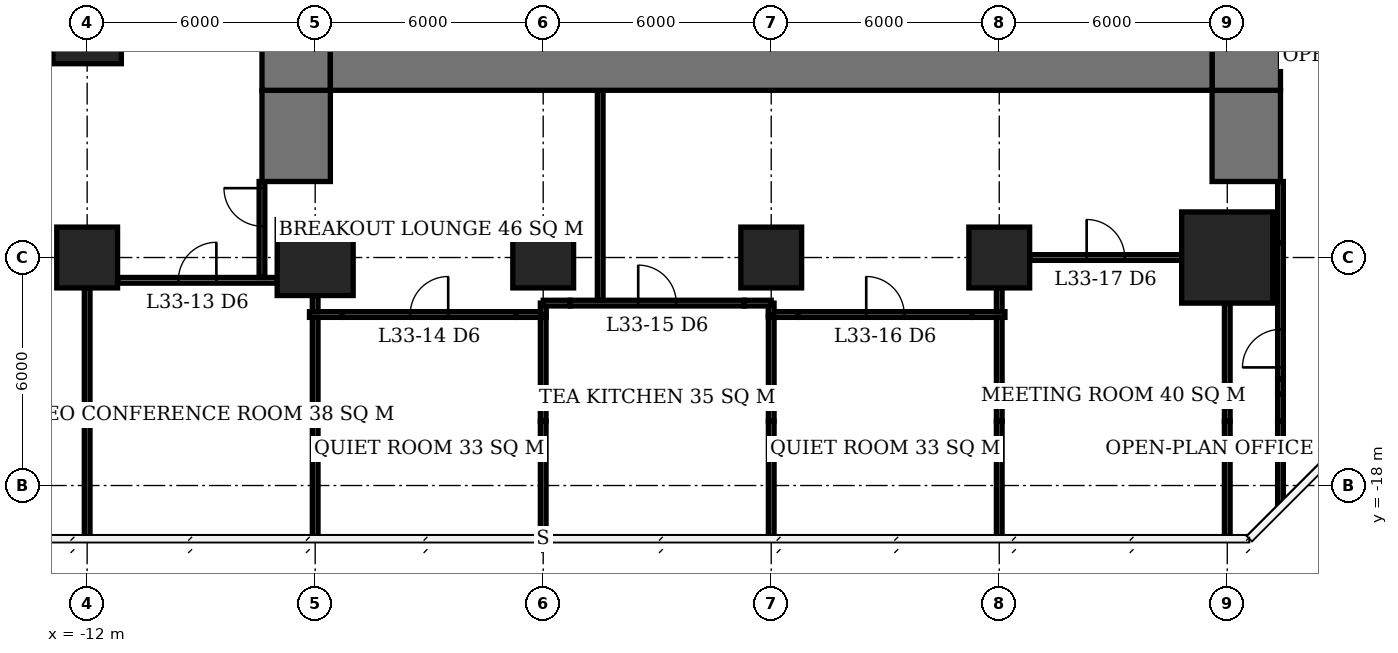
"""IFC4 building model, lengths in metres.
Left out: names, types, materials, properties, quantities, classifications, styles, units other than length and angle.
Written with IfcOpenShell. Run it as: python <this file> out.ifc"""

import sys

from ifc_helpers import new_model, si_unit, direction, frame, frame_2d, origin, origin_2d, place, context, subcontext, project, spatial, rectangle, extrude, element, fill, save


model = new_model("IFC4")
c1 = context("Model", 3, precision=1e-05, world=origin(), true_north=direction((0.0, 1.0)))
c2 = subcontext(c1, "Body", "Model", "MODEL_VIEW")
j1 = project(units=[si_unit("LENGTHUNIT", "METRE"), si_unit("PLANEANGLEUNIT", "RADIAN")], contexts=[c1])
p1 = place(None, origin())
s1 = spatial("IfcSite", under=j1, at=p1, CompositionType="ELEMENT")
p2 = place(p1, origin())
s2 = spatial("IfcBuilding", under=s1, at=p2, CompositionType="ELEMENT")
p3 = place(p2, frame((0.0, 0.0, 136.7)))
s3 = spatial("IfcBuildingStorey", under=s2, at=p3, CompositionType="ELEMENT", Elevation=136.7)
p4 = place(p3, frame((-12.0, -12.0, 0.0), z_axis=(0.0, 0.0, 1.0), x_axis=(1.0, 0.0, 0.0)))
e1 = element("IfcColumn", 1, at=p4, inside=s3, PredefinedType="COLUMN", context=c2, shape_type="SweptSolid", body=[
    extrude(rectangle(XDim=1.6, YDim=1.6, at=origin_2d()), origin(), (0.0, 0.0, 1.0), 3.9),
])
p5 = place(p3, frame((-12.0, -6.0, 0.0), z_axis=(0.0, 0.0, 1.0), x_axis=(1.0, 0.0, 0.0)))
e2 = element("IfcColumn", 2, at=p5, inside=s3, PredefinedType="COLUMN", context=c2, shape_type="SweptSolid", body=[
    extrude(rectangle(XDim=1.8, YDim=1.8, at=origin_2d()), origin(), (0.0, 0.0, 1.0), 3.9),
])
p6 = place(p3, frame((-6.0, -12.0, 0.0), z_axis=(0.0, 0.0, 1.0), x_axis=(1.0, 0.0, 0.0)))
e3 = element("IfcColumn", 3, at=p6, inside=s3, PredefinedType="COLUMN", context=c2, shape_type="SweptSolid", body=[
    extrude(rectangle(XDim=2.0, YDim=2.0, at=origin_2d()), origin(), (0.0, 0.0, 1.0), 3.9),
])
for number, where, z_axis, x_axis in (
    (4, (0.0, -12.0, 0.0), (0.0, 0.0, 1.0), (1.0, 0.0, 0.0)),
    (5, (6.0, -12.0, 0.0), (0.0, 0.0, 1.0), (1.0, 0.0, 0.0)),
    (6, (12.0, -12.0, 0.0), (0.0, 0.0, 1.0), (1.0, 0.0, 0.0)),
):
    element("IfcColumn", number, at=place(p3, frame(where, z_axis=z_axis, x_axis=x_axis)), inside=s3, PredefinedType="COLUMN", context=c2, shape_type="SweptSolid", body=[
        extrude(rectangle(XDim=1.6, YDim=1.6, at=origin_2d()), origin(), (0.0, 0.0, 1.0), 3.9),
    ])
p7 = place(p3, frame((18.0, -12.0, 0.0), z_axis=(0.0, 0.0, 1.0), x_axis=(1.0, 0.0, 0.0)))
e7 = element("IfcColumn", 7, at=p7, inside=s3, PredefinedType="COLUMN", context=c2, shape_type="SweptSolid", body=[
    extrude(rectangle(XDim=2.4, YDim=2.4, at=origin_2d()), origin(), (0.0, 0.0, 1.0), 3.9),
])
p8 = place(p3, frame((-5.6, -6.6, 0.0), z_axis=(0.0, 0.0, 1.0), x_axis=(1.0, 0.0, 0.0)))
e8 = element("IfcWall", 8, at=p8, inside=s3, PredefinedType="SHEAR", context=c2, shape_type="SweptSolid", body=[
    extrude(rectangle(XDim=23.2, YDim=2.0, at=frame_2d((11.6, 0.0))), origin(), (0.0, 0.0, 1.0), 3.9),
])
p9 = place(p3, frame((-6.5, -7.6, 0.0), z_axis=(0.0, 0.0, 1.0), x_axis=(0.0, 1.0, 0.0)))
e9 = element("IfcWall", 9, at=p9, inside=s3, PredefinedType="SHEAR", context=c2, shape_type="SweptSolid", body=[
    extrude(rectangle(XDim=21.2, YDim=1.8, at=frame_2d((10.6, 0.0))), origin(), (0.0, 0.0, 1.0), 3.9),
])
p10 = place(p9, frame((7.8, 0.0, 0.0)))
e10 = element("IfcOpeningElement", 10, at=p10, cuts=e9, PredefinedType="OPENING", context=c2, shape_type="SweptSolid", body=[
    extrude(rectangle(XDim=1.8, YDim=2.4, at=frame_2d((0.9, 1.2))), frame((0.0, 0.91, 0.0), z_axis=(0.0, -1.0, 0.0), x_axis=(1.0, 0.0, 0.0)), (0.0, 0.0, 1.0), 1.82),
])
p11 = place(p3, frame((18.5, -7.6, 0.0), z_axis=(0.0, 0.0, 1.0), x_axis=(0.0, 1.0, 0.0)))
e11 = element("IfcWall", 11, at=p11, inside=s3, PredefinedType="SHEAR", context=c2, shape_type="SweptSolid", body=[
    extrude(rectangle(XDim=21.2, YDim=1.8, at=frame_2d((10.6, 0.0))), origin(), (0.0, 0.0, 1.0), 3.9),
])
p12 = place(p11, frame((9.2, 0.0, 0.0)))
e12 = element("IfcOpeningElement", 12, at=p12, cuts=e11, PredefinedType="OPENING", context=c2, shape_type="SweptSolid", body=[
    extrude(rectangle(XDim=1.8, YDim=2.4, at=frame_2d((0.9, 1.2))), frame((0.0, 0.91, 0.0), z_axis=(0.0, -1.0, 0.0), x_axis=(1.0, 0.0, 0.0)), (0.0, 0.0, 1.0), 1.82),
])
for number, where, z_axis, x_axis in (
    (13, (-6.5, -10.0, 0.0), (0.0, 0.0, 1.0), (0.0, 1.0, 0.0)),
    (14, (18.5, -10.0, 0.0), (0.0, 0.0, 1.0), (0.0, 1.0, 0.0)),
):
    element("IfcWall", number, at=place(p3, frame(where, z_axis=z_axis, x_axis=x_axis)), inside=s3, PredefinedType="SHEAR", context=c2, shape_type="SweptSolid", body=[
        extrude(rectangle(XDim=2.4, YDim=1.8, at=frame_2d((1.2, 0.0))), origin(), (0.0, 0.0, 1.0), 3.9),
    ])
p13 = place(p3, frame((-6.15, -13.5, 0.0), z_axis=(0.0, 0.0, 1.0), x_axis=(1.0, 0.0, 0.0)))
e15 = element("IfcWall", 15, at=p13, inside=s3, PredefinedType="PARTITIONING", context=c2, shape_type="SweptSolid", body=[
    extrude(rectangle(XDim=0.86, YDim=0.15, at=frame_2d((0.43, 0.0))), origin(), (0.0, 0.0, 1.0), 2.65),
])
p14 = place(p3, frame((-5.29, -13.5, 0.0), z_axis=(0.0, 0.0, 1.0), x_axis=(1.0, 0.0, 0.0)))
e16 = element("IfcWall", 16, at=p14, inside=s3, PredefinedType="PARTITIONING", context=c2, shape_type="SweptSolid", body=[
    extrude(rectangle(XDim=4.58, YDim=0.15, at=frame_2d((2.29, 0.0))), origin(), (0.0, 0.0, 1.0), 3.65),
])
p15 = place(p14, frame((1.79, 0.0, 0.0)))
e17 = element("IfcOpeningElement", 17, at=p15, cuts=e16, PredefinedType="OPENING", context=c2, shape_type="SweptSolid", body=[
    extrude(rectangle(XDim=1.0, YDim=2.1, at=frame_2d((0.5, 1.05))), frame((0.0, 0.085, 0.0), z_axis=(0.0, -1.0, 0.0), x_axis=(1.0, 0.0, 0.0)), (0.0, 0.0, 1.0), 0.17),
])
for number, where, z_axis, x_axis in (
    (18, (-0.71, -13.5, 0.0), (0.0, 0.0, 1.0), (1.0, 0.0, 0.0)),
    (19, (5.925, -13.5, 0.0), (0.0, 0.0, 1.0), (1.0, 0.0, 0.0)),
):
    element("IfcWall", number, at=place(p3, frame(where, z_axis=z_axis, x_axis=x_axis)), inside=s3, PredefinedType="PARTITIONING", context=c2, shape_type="SweptSolid", body=[
        extrude(rectangle(XDim=0.785, YDim=0.15, at=frame_2d((0.393, 0.0))), origin(), (0.0, 0.0, 1.0), 2.65),
    ])
p16 = place(p3, frame((6.71, -13.5, 0.0), z_axis=(0.0, 0.0, 1.0), x_axis=(1.0, 0.0, 0.0)))
e20 = element("IfcWall", 20, at=p16, inside=s3, PredefinedType="PARTITIONING", context=c2, shape_type="SweptSolid", body=[
    extrude(rectangle(XDim=4.58, YDim=0.15, at=frame_2d((2.29, 0.0))), origin(), (0.0, 0.0, 1.0), 3.65),
])
p17 = place(p16, frame((1.79, 0.0, 0.0)))
e21 = element("IfcOpeningElement", 21, at=p17, cuts=e20, PredefinedType="OPENING", context=c2, shape_type="SweptSolid", body=[
    extrude(rectangle(XDim=1.0, YDim=2.1, at=frame_2d((0.5, 1.05))), frame((0.0, 0.085, 0.0), z_axis=(0.0, -1.0, 0.0), x_axis=(1.0, 0.0, 0.0)), (0.0, 0.0, 1.0), 0.17),
])
p18 = place(p3, frame((11.29, -13.5, 0.0), z_axis=(0.0, 0.0, 1.0), x_axis=(1.0, 0.0, 0.0)))
e22 = element("IfcWall", 22, at=p18, inside=s3, PredefinedType="PARTITIONING", context=c2, shape_type="SweptSolid", body=[
    extrude(rectangle(XDim=0.86, YDim=0.15, at=frame_2d((0.43, 0.0))), origin(), (0.0, 0.0, 1.0), 2.65),
])
p19 = place(p3, frame((0.0, -13.2, 0.0), z_axis=(0.0, 0.0, 1.0), x_axis=(1.0, 0.0, 0.0)))
e23 = element("IfcWall", 23, at=p19, inside=s3, PredefinedType="PARTITIONING", context=c2, shape_type="SweptSolid", body=[
    extrude(rectangle(XDim=0.71, YDim=0.15, at=frame_2d((0.355, 0.0))), origin(), (0.0, 0.0, 1.0), 2.65),
])
p20 = place(p3, frame((0.71, -13.2, 0.0), z_axis=(0.0, 0.0, 1.0), x_axis=(1.0, 0.0, 0.0)))
e24 = element("IfcWall", 24, at=p20, inside=s3, PredefinedType="PARTITIONING", context=c2, shape_type="SweptSolid", body=[
    extrude(rectangle(XDim=4.58, YDim=0.15, at=frame_2d((2.29, 0.0))), origin(), (0.0, 0.0, 1.0), 3.65),
])
p21 = place(p20, frame((1.79, 0.0, 0.0)))
e25 = element("IfcOpeningElement", 25, at=p21, cuts=e24, PredefinedType="OPENING", context=c2, shape_type="SweptSolid", body=[
    extrude(rectangle(XDim=1.0, YDim=2.1, at=frame_2d((0.5, 1.05))), frame((0.0, 0.085, 0.0), z_axis=(0.0, -1.0, 0.0), x_axis=(1.0, 0.0, 0.0)), (0.0, 0.0, 1.0), 0.17),
])
p22 = place(p3, frame((5.29, -13.2, 0.0), z_axis=(0.0, 0.0, 1.0), x_axis=(1.0, 0.0, 0.0)))
e26 = element("IfcWall", 26, at=p22, inside=s3, PredefinedType="PARTITIONING", context=c2, shape_type="SweptSolid", body=[
    extrude(rectangle(XDim=0.71, YDim=0.15, at=frame_2d((0.355, 0.0))), origin(), (0.0, 0.0, 1.0), 2.65),
])
p23 = place(p3, frame((-11.2, -12.6, 0.0), z_axis=(0.0, 0.0, 1.0), x_axis=(1.0, 0.0, 0.0)))
e27 = element("IfcWall", 27, at=p23, inside=s3, PredefinedType="PARTITIONING", context=c2, shape_type="SweptSolid", body=[
    extrude(rectangle(XDim=4.2, YDim=0.15, at=frame_2d((2.1, 0.0))), origin(), (0.0, 0.0, 1.0), 3.65),
])
p24 = place(p23, frame((1.6, 0.0, 0.0)))
e28 = element("IfcOpeningElement", 28, at=p24, cuts=e27, PredefinedType="OPENING", context=c2, shape_type="SweptSolid", body=[
    extrude(rectangle(XDim=1.0, YDim=2.1, at=frame_2d((0.5, 1.05))), frame((0.0, 0.085, 0.0), z_axis=(0.0, -1.0, 0.0), x_axis=(1.0, 0.0, 0.0)), (0.0, 0.0, 1.0), 0.17),
])
p25 = place(p3, frame((12.8, -12.0, 0.0), z_axis=(0.0, 0.0, 1.0), x_axis=(1.0, 0.0, 0.0)))
e29 = element("IfcWall", 29, at=p25, inside=s3, PredefinedType="PARTITIONING", context=c2, shape_type="SweptSolid", body=[
    extrude(rectangle(XDim=4.0, YDim=0.15, at=frame_2d((2.0, 0.0))), origin(), (0.0, 0.0, 1.0), 3.65),
])
p26 = place(p25, frame((1.5, 0.0, 0.0)))
e30 = element("IfcOpeningElement", 30, at=p26, cuts=e29, PredefinedType="OPENING", context=c2, shape_type="SweptSolid", body=[
    extrude(rectangle(XDim=1.0, YDim=2.1, at=frame_2d((0.5, 1.05))), frame((0.0, 0.085, 0.0), z_axis=(0.0, -1.0, 0.0), x_axis=(1.0, 0.0, 0.0)), (0.0, 0.0, 1.0), 0.17),
])
p27 = place(p3, frame((-12.0, -19.4, 0.0), z_axis=(0.0, 0.0, 1.0), x_axis=(0.0, 1.0, 0.0)))
e31 = element("IfcWall", 31, at=p27, inside=s3, PredefinedType="PARTITIONING", context=c2, shape_type="SweptSolid", body=[
    extrude(rectangle(XDim=3.09, YDim=0.15, at=frame_2d((1.545, 0.0))), origin(), (0.0, 0.0, 1.0), 3.65),
])
p28 = place(p3, frame((-12.0, -16.31, 0.0), z_axis=(0.0, 0.0, 1.0), x_axis=(0.0, 1.0, 0.0)))
e32 = element("IfcWall", 32, at=p28, inside=s3, PredefinedType="PARTITIONING", context=c2, shape_type="SweptSolid", body=[
    extrude(rectangle(XDim=3.51, YDim=0.15, at=frame_2d((1.755, 0.0))), origin(), (0.0, 0.0, 1.0), 2.65),
])
p29 = place(p3, frame((-6.0, -19.4, 0.0), z_axis=(0.0, 0.0, 1.0), x_axis=(0.0, 1.0, 0.0)))
e33 = element("IfcWall", 33, at=p29, inside=s3, PredefinedType="PARTITIONING", context=c2, shape_type="SweptSolid", body=[
    extrude(rectangle(XDim=3.09, YDim=0.15, at=frame_2d((1.545, 0.0))), origin(), (0.0, 0.0, 1.0), 3.65),
])
p30 = place(p3, frame((-6.0, -16.31, 0.0), z_axis=(0.0, 0.0, 1.0), x_axis=(0.0, 1.0, 0.0)))
e34 = element("IfcWall", 34, at=p30, inside=s3, PredefinedType="PARTITIONING", context=c2, shape_type="SweptSolid", body=[
    extrude(rectangle(XDim=2.735, YDim=0.15, at=frame_2d((1.368, 0.0))), origin(), (0.0, 0.0, 1.0), 2.65),
])
p31 = place(p3, frame((-6.0, -13.425, 0.0), z_axis=(0.0, 0.0, 1.0), x_axis=(0.0, 1.0, 0.0)))
e35 = element("IfcWall", 35, at=p31, inside=s3, PredefinedType="PARTITIONING", context=c2, shape_type="SweptSolid", body=[
    extrude(rectangle(XDim=0.425, YDim=0.15, at=frame_2d((0.212, 0.0))), origin(), (0.0, 0.0, 1.0), 2.65),
])
p32 = place(p3, frame((0.0, -19.35, 0.0), z_axis=(0.0, 0.0, 1.0), x_axis=(0.0, 1.0, 0.0)))
e36 = element("IfcWall", 36, at=p32, inside=s3, PredefinedType="PARTITIONING", context=c2, shape_type="SweptSolid", body=[
    extrude(rectangle(XDim=3.04, YDim=0.15, at=frame_2d((1.52, 0.0))), origin(), (0.0, 0.0, 1.0), 3.65),
])
p33 = place(p3, frame((0.0, -16.31, 0.0), z_axis=(0.0, 0.0, 1.0), x_axis=(0.0, 1.0, 0.0)))
e37 = element("IfcWall", 37, at=p33, inside=s3, PredefinedType="PARTITIONING", context=c2, shape_type="SweptSolid", body=[
    extrude(rectangle(XDim=2.735, YDim=0.15, at=frame_2d((1.368, 0.0))), origin(), (0.0, 0.0, 1.0), 2.65),
])
p34 = place(p3, frame((0.0, -13.5, 0.0), z_axis=(0.0, 0.0, 1.0), x_axis=(0.0, 1.0, 0.0)))
e38 = element("IfcWall", 38, at=p34, inside=s3, PredefinedType="PARTITIONING", context=c2, shape_type="SweptSolid", body=[
    extrude(rectangle(XDim=0.3, YDim=0.15, at=frame_2d((0.15, 0.0))), origin(), (0.0, 0.0, 1.0), 2.65),
])
p35 = place(p3, frame((6.0, -19.4, 0.0), z_axis=(0.0, 0.0, 1.0), x_axis=(0.0, 1.0, 0.0)))
e39 = element("IfcWall", 39, at=p35, inside=s3, PredefinedType="PARTITIONING", context=c2, shape_type="SweptSolid", body=[
    extrude(rectangle(XDim=3.09, YDim=0.15, at=frame_2d((1.545, 0.0))), origin(), (0.0, 0.0, 1.0), 3.65),
])
p36 = place(p3, frame((6.0, -16.31, 0.0), z_axis=(0.0, 0.0, 1.0), x_axis=(0.0, 1.0, 0.0)))
e40 = element("IfcWall", 40, at=p36, inside=s3, PredefinedType="PARTITIONING", context=c2, shape_type="SweptSolid", body=[
    extrude(rectangle(XDim=2.735, YDim=0.15, at=frame_2d((1.368, 0.0))), origin(), (0.0, 0.0, 1.0), 2.65),
])
p37 = place(p3, frame((6.0, -13.5, 0.0), z_axis=(0.0, 0.0, 1.0), x_axis=(0.0, 1.0, 0.0)))
e41 = element("IfcWall", 41, at=p37, inside=s3, PredefinedType="PARTITIONING", context=c2, shape_type="SweptSolid", body=[
    extrude(rectangle(XDim=0.3, YDim=0.15, at=frame_2d((0.15, 0.0))), origin(), (0.0, 0.0, 1.0), 2.65),
])
p38 = place(p3, frame((12.0, -19.4, 0.0), z_axis=(0.0, 0.0, 1.0), x_axis=(0.0, 1.0, 0.0)))
e42 = element("IfcWall", 42, at=p38, inside=s3, PredefinedType="PARTITIONING", context=c2, shape_type="SweptSolid", body=[
    extrude(rectangle(XDim=3.09, YDim=0.15, at=frame_2d((1.545, 0.0))), origin(), (0.0, 0.0, 1.0), 3.65),
])
p39 = place(p3, frame((12.0, -16.31, 0.0), z_axis=(0.0, 0.0, 1.0), x_axis=(0.0, 1.0, 0.0)))
e43 = element("IfcWall", 43, at=p39, inside=s3, PredefinedType="PARTITIONING", context=c2, shape_type="SweptSolid", body=[
    extrude(rectangle(XDim=2.735, YDim=0.15, at=frame_2d((1.368, 0.0))), origin(), (0.0, 0.0, 1.0), 2.65),
])
p40 = place(p3, frame((12.0, -13.425, 0.0), z_axis=(0.0, 0.0, 1.0), x_axis=(0.0, 1.0, 0.0)))
e44 = element("IfcWall", 44, at=p40, inside=s3, PredefinedType="PARTITIONING", context=c2, shape_type="SweptSolid", body=[
    extrude(rectangle(XDim=0.625, YDim=0.15, at=frame_2d((0.312, 0.0))), origin(), (0.0, 0.0, 1.0), 2.65),
])
p41 = place(p3, frame((18.0, -19.4, 0.0), z_axis=(0.0, 0.0, 1.0), x_axis=(0.0, 1.0, 0.0)))
e45 = element("IfcWall", 45, at=p41, inside=s3, PredefinedType="PARTITIONING", context=c2, shape_type="SweptSolid", body=[
    extrude(rectangle(XDim=3.09, YDim=0.15, at=frame_2d((1.545, 0.0))), origin(), (0.0, 0.0, 1.0), 3.65),
])
p42 = place(p3, frame((18.0, -16.31, 0.0), z_axis=(0.0, 0.0, 1.0), x_axis=(0.0, 1.0, 0.0)))
e46 = element("IfcWall", 46, at=p42, inside=s3, PredefinedType="PARTITIONING", context=c2, shape_type="SweptSolid", body=[
    extrude(rectangle(XDim=3.11, YDim=0.15, at=frame_2d((1.555, 0.0))), origin(), (0.0, 0.0, 1.0), 2.65),
])
p43 = place(p3, frame((-7.4, -12.525, 0.0), z_axis=(0.0, 0.0, 1.0), x_axis=(0.0, 1.0, 0.0)))
e47 = element("IfcWall", 47, at=p43, inside=s3, PredefinedType="PARTITIONING", context=c2, shape_type="SweptSolid", body=[
    extrude(rectangle(XDim=2.525, YDim=0.15, at=frame_2d((1.262, 0.0))), origin(), (0.0, 0.0, 1.0), 3.65),
])
p44 = place(p43, frame((1.35, 0.0, 0.0)))
e48 = element("IfcOpeningElement", 48, at=p44, cuts=e47, PredefinedType="OPENING", context=c2, shape_type="SweptSolid", body=[
    extrude(rectangle(XDim=1.0, YDim=2.1, at=frame_2d((0.5, 1.05))), frame((0.0, 0.085, 0.0), z_axis=(0.0, -1.0, 0.0), x_axis=(1.0, 0.0, 0.0)), (0.0, 0.0, 1.0), 0.17),
])
p45 = place(p3, frame((1.5, -13.125, 0.0), z_axis=(0.0, 0.0, 1.0), x_axis=(0.0, 1.0, 0.0)))
e49 = element("IfcWall", 49, at=p45, inside=s3, PredefinedType="PARTITIONING", context=c2, shape_type="SweptSolid", body=[
    extrude(rectangle(XDim=5.525, YDim=0.15, at=frame_2d((2.762, 0.0))), origin(), (0.0, 0.0, 1.0), 3.65),
])
p46 = place(p3, frame((19.4, -18.489, 0.0), z_axis=(0.0, 0.0, 1.0), x_axis=(0.0, 1.0, 0.0)))
e50 = element("IfcWall", 50, at=p46, inside=s3, PredefinedType="PARTITIONING", context=c2, shape_type="SweptSolid", body=[
    extrude(rectangle(XDim=2.179, YDim=0.15, at=frame_2d((1.089, 0.0))), origin(), (0.0, 0.0, 1.0), 3.65),
])
p47 = place(p3, frame((19.4, -16.31, 0.0), z_axis=(0.0, 0.0, 1.0), x_axis=(0.0, 1.0, 0.0)))
e51 = element("IfcWall", 51, at=p47, inside=s3, PredefinedType="PARTITIONING", context=c2, shape_type="SweptSolid", body=[
    extrude(rectangle(XDim=0.72, YDim=0.15, at=frame_2d((0.36, 0.0))), origin(), (0.0, 0.0, 1.0), 2.65),
])
p48 = place(p3, frame((19.4, -15.59, 0.0), z_axis=(0.0, 0.0, 1.0), x_axis=(0.0, 1.0, 0.0)))
e52 = element("IfcWall", 52, at=p48, inside=s3, PredefinedType="PARTITIONING", context=c2, shape_type="SweptSolid", body=[
    extrude(rectangle(XDim=0.398, YDim=0.15, at=frame_2d((0.199, 0.0))), origin(), (0.0, 0.0, 1.0), 3.65),
])
p49 = place(p3, frame((19.4, -15.192, 0.0), z_axis=(0.0, 0.0, 1.0), x_axis=(0.0, 1.0, 0.0)))
e53 = element("IfcWall", 53, at=p49, inside=s3, PredefinedType="PARTITIONING", context=c2, shape_type="SweptSolid", body=[
    extrude(rectangle(XDim=3.584, YDim=0.15, at=frame_2d((1.792, 0.0))), origin(), (0.0, 0.0, 1.0), 2.65),
])
p50 = place(p49, frame((0.3, 0.0, 0.0)))
e54 = element("IfcOpeningElement", 54, at=p50, cuts=e53, PredefinedType="OPENING", context=c2, shape_type="SweptSolid", body=[
    extrude(rectangle(XDim=1.0, YDim=2.1, at=frame_2d((0.5, 1.05))), frame((0.0, 0.085, 0.0), z_axis=(0.0, -1.0, 0.0), x_axis=(1.0, 0.0, 0.0)), (0.0, 0.0, 1.0), 0.17),
])
p51 = place(p3, frame((19.4, -11.608, 0.0), z_axis=(0.0, 0.0, 1.0), x_axis=(0.0, 1.0, 0.0)))
e55 = element("IfcWall", 55, at=p51, inside=s3, PredefinedType="PARTITIONING", context=c2, shape_type="SweptSolid", body=[
    extrude(rectangle(XDim=1.608, YDim=0.15, at=frame_2d((0.804, 0.0))), origin(), (0.0, 0.0, 1.0), 3.65),
])
p52 = place(p24, origin())
e56 = element("IfcDoor", 56, at=p52, inside=s3, OperationType="SINGLE_SWING_RIGHT", PredefinedType="DOOR", context=c2, shape_type="SweptSolid", body=[
    extrude(rectangle(XDim=1.0, YDim=2.1, at=frame_2d((0.5, 1.05))), frame((0.0, 0.025, 0.0), z_axis=(0.0, -1.0, 0.0), x_axis=(1.0, 0.0, 0.0)), (0.0, 0.0, 1.0), 0.05),
])
fill(e28, e56)
p53 = place(p15, origin())
e57 = element("IfcDoor", 57, at=p53, inside=s3, OperationType="SINGLE_SWING_RIGHT", PredefinedType="DOOR", context=c2, shape_type="SweptSolid", body=[
    extrude(rectangle(XDim=1.0, YDim=2.1, at=frame_2d((0.5, 1.05))), frame((0.0, 0.025, 0.0), z_axis=(0.0, -1.0, 0.0), x_axis=(1.0, 0.0, 0.0)), (0.0, 0.0, 1.0), 0.05),
])
fill(e17, e57)
p54 = place(p21, origin())
e58 = element("IfcDoor", 58, at=p54, inside=s3, OperationType="SINGLE_SWING_LEFT", PredefinedType="DOOR", context=c2, shape_type="SweptSolid", body=[
    extrude(rectangle(XDim=1.0, YDim=2.1, at=frame_2d((0.5, 1.05))), frame((0.0, 0.025, 0.0), z_axis=(0.0, -1.0, 0.0), x_axis=(1.0, 0.0, 0.0)), (0.0, 0.0, 1.0), 0.05),
])
fill(e25, e58)
p55 = place(p17, origin())
e59 = element("IfcDoor", 59, at=p55, inside=s3, OperationType="SINGLE_SWING_LEFT", PredefinedType="DOOR", context=c2, shape_type="SweptSolid", body=[
    extrude(rectangle(XDim=1.0, YDim=2.1, at=frame_2d((0.5, 1.05))), frame((0.0, 0.025, 0.0), z_axis=(0.0, -1.0, 0.0), x_axis=(1.0, 0.0, 0.0)), (0.0, 0.0, 1.0), 0.05),
])
fill(e21, e59)
p56 = place(p26, origin())
e60 = element("IfcDoor", 60, at=p56, inside=s3, OperationType="SINGLE_SWING_LEFT", PredefinedType="DOOR", context=c2, shape_type="SweptSolid", body=[
    extrude(rectangle(XDim=1.0, YDim=2.1, at=frame_2d((0.5, 1.05))), frame((0.0, 0.025, 0.0), z_axis=(0.0, -1.0, 0.0), x_axis=(1.0, 0.0, 0.0)), (0.0, 0.0, 1.0), 0.05),
])
fill(e30, e60)
p57 = place(p50, origin())
e61 = element("IfcDoor", 61, at=p57, inside=s3, OperationType="SINGLE_SWING_LEFT", PredefinedType="DOOR", context=c2, shape_type="SweptSolid", body=[
    extrude(rectangle(XDim=1.0, YDim=2.1, at=frame_2d((0.5, 1.05))), frame((0.0, 0.025, 0.0), z_axis=(0.0, -1.0, 0.0), x_axis=(1.0, 0.0, 0.0)), (0.0, 0.0, 1.0), 0.05),
])
fill(e54, e61)
p58 = place(p44, origin())
e62 = element("IfcDoor", 62, at=p58, inside=s3, OperationType="SINGLE_SWING_RIGHT", PredefinedType="DOOR", context=c2, shape_type="SweptSolid", body=[
    extrude(rectangle(XDim=1.0, YDim=2.1, at=frame_2d((0.5, 1.05))), frame((0.0, 0.025, 0.0), z_axis=(0.0, -1.0, 0.0), x_axis=(1.0, 0.0, 0.0)), (0.0, 0.0, 1.0), 0.05),
])
fill(e48, e62)
save(model, sys.argv[1])
